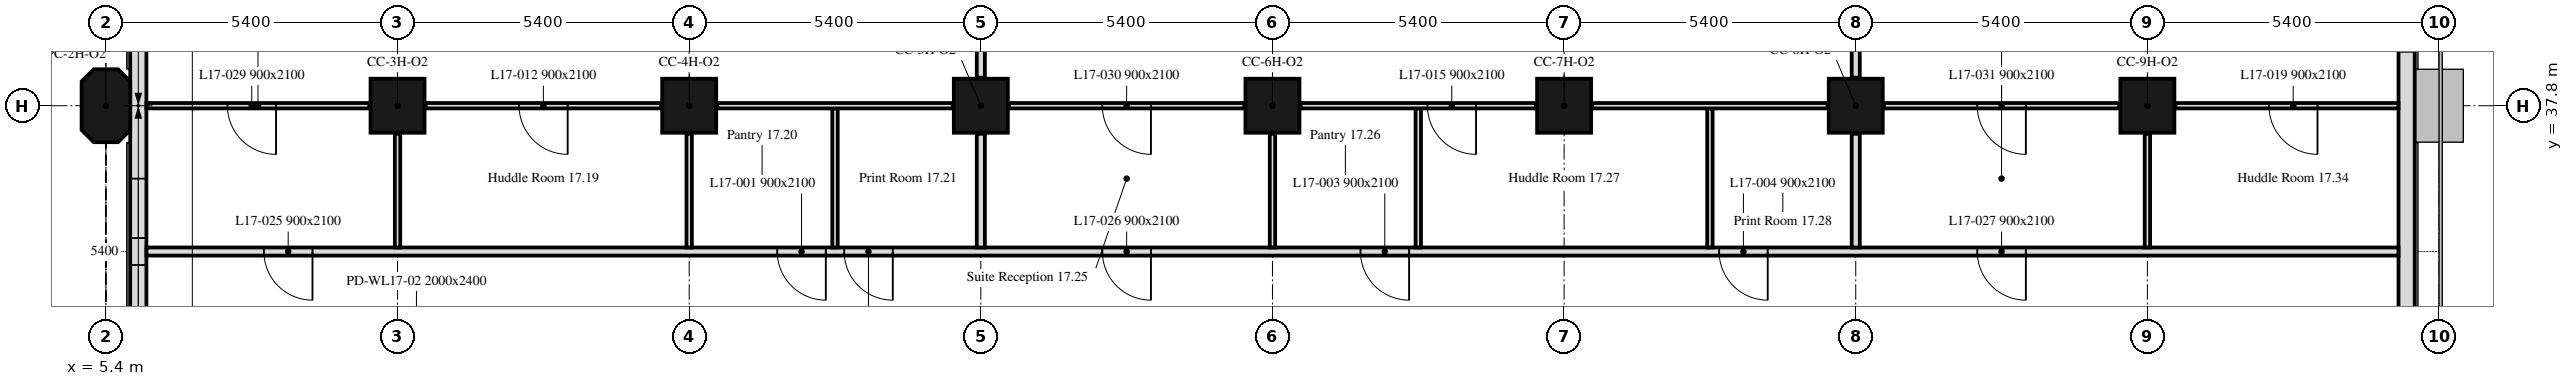
"""IFC4 building model, lengths in metres.
Left out: names, types, materials, properties, quantities, classifications, styles, units other than length and angle.
Written with IfcOpenShell. Run it as: python <this file> out.ifc"""

import sys

from ifc_helpers import new_model, si_unit, direction, frame, frame_2d, origin, origin_2d, place, context, subcontext, project, spatial, polyline, rectangle, outline, extrude, element, fill, save


model = new_model("IFC4")
c1 = context("Model", 3, precision=1e-05, world=origin(), true_north=direction((0.0, 1.0)))
c2 = subcontext(c1, "Body", "Model", "MODEL_VIEW")
j1 = project(units=[si_unit("LENGTHUNIT", "METRE"), si_unit("PLANEANGLEUNIT", "RADIAN")], contexts=[c1])
p1 = place(None, origin())
s1 = spatial("IfcSite", under=j1, at=p1, CompositionType="ELEMENT")
p2 = place(p1, origin())
s2 = spatial("IfcBuilding", under=s1, at=p2, CompositionType="ELEMENT")
p3 = place(p2, frame((0.0, 0.0, 76.4)))
s3 = spatial("IfcBuildingStorey", under=s2, at=p3, CompositionType="ELEMENT", Elevation=76.4)
p4 = place(p3, frame((5.4, 37.8, 0.0), z_axis=(0.0, 0.0, 1.0), x_axis=(0.0, 1.0, 0.0)))
e1 = element("IfcColumn", 1, at=p4, inside=s3, PredefinedType="COLUMN", context=c2, shape_type="SweptSolid", body=[
    extrude(outline(polyline([(-0.45, -0.45), (0.45, -0.45), (0.675, -0.225), (0.675, 0.225), (0.45, 0.45), (-0.45, 0.45), (-0.675, 0.225), (-0.675, -0.225), (-0.45, -0.45)])), origin(), (0.0, 0.0, 1.0), 3.5),
])
for number, where, z_axis, x_axis in (
    (2, (10.8, 37.8, 0.0), (0.0, 0.0, 1.0), (1.0, 0.0, 0.0)),
    (3, (16.2, 37.8, 0.0), (0.0, 0.0, 1.0), (1.0, 0.0, 0.0)),
    (4, (21.6, 37.8, 0.0), (0.0, 0.0, 1.0), (1.0, 0.0, 0.0)),
    (5, (27.0, 37.8, 0.0), (0.0, 0.0, 1.0), (1.0, 0.0, 0.0)),
    (6, (32.4, 37.8, 0.0), (0.0, 0.0, 1.0), (1.0, 0.0, 0.0)),
    (7, (37.8, 37.8, 0.0), (0.0, 0.0, 1.0), (1.0, 0.0, 0.0)),
    (8, (43.2, 37.8, 0.0), (0.0, 0.0, 1.0), (1.0, 0.0, 0.0)),
):
    element("IfcColumn", number, at=place(p3, frame(where, z_axis=z_axis, x_axis=x_axis)), inside=s3, PredefinedType="COLUMN", context=c2, shape_type="SweptSolid", body=[
        extrude(rectangle(XDim=1.0, YDim=1.0, at=origin_2d()), origin(), (0.0, 0.0, 1.0), 3.5),
    ])
p5 = place(p3, frame((48.0, 10.986, 0.0), z_axis=(0.0, 0.0, 1.0), x_axis=(0.0, 1.0, 0.0)))
e9 = element("IfcWall", 9, at=p5, inside=s3, PredefinedType="SOLIDWALL", context=c2, shape_type="SweptSolid", body=[
    extrude(rectangle(XDim=32.027, YDim=0.3, at=frame_2d((16.014, 0.0))), origin(), (0.0, 0.0, 1.0), 3.5),
])
p6 = place(p5, frame((6.214, 0.0, 0.9)))
e10 = element("IfcOpeningElement", 10, at=p6, cuts=e9, PredefinedType="OPENING", context=c2, shape_type="SweptSolid", body=[
    extrude(rectangle(XDim=3.4, YDim=1.7, at=frame_2d((1.7, 0.85))), frame((0.0, 0.16, 0.0), z_axis=(0.0, -1.0, 0.0), x_axis=(1.0, 0.0, 0.0)), (0.0, 0.0, 1.0), 0.32),
])
p7 = place(p5, frame((17.014, 0.0, 0.9)))
e11 = element("IfcOpeningElement", 11, at=p7, cuts=e9, PredefinedType="OPENING", context=c2, shape_type="SweptSolid", body=[
    extrude(rectangle(XDim=3.4, YDim=1.7, at=frame_2d((1.7, 0.85))), frame((0.0, 0.16, 0.0), z_axis=(0.0, -1.0, 0.0), x_axis=(1.0, 0.0, 0.0)), (0.0, 0.0, 1.0), 0.32),
])
p8 = place(p5, frame((27.814, 0.0, 0.9)))
e12 = element("IfcOpeningElement", 12, at=p8, cuts=e9, PredefinedType="OPENING", context=c2, shape_type="SweptSolid", body=[
    extrude(rectangle(XDim=3.4, YDim=1.7, at=frame_2d((1.7, 0.85))), frame((0.0, 0.16, 0.0), z_axis=(0.0, -1.0, 0.0), x_axis=(1.0, 0.0, 0.0)), (0.0, 0.0, 1.0), 0.32),
])
p9 = place(p3, frame((6.0, 43.014, 0.0), z_axis=(0.0, 0.0, 1.0), x_axis=(0.0, -1.0, 0.0)))
e13 = element("IfcWall", 13, at=p9, inside=s3, PredefinedType="SOLIDWALL", context=c2, shape_type="SweptSolid", body=[
    extrude(rectangle(XDim=10.614, YDim=0.3, at=frame_2d((5.307, 0.0))), origin(), (0.0, 0.0, 1.0), 3.5),
])
p10 = place(p9, frame((6.564, 0.0, 0.9)))
e14 = element("IfcOpeningElement", 14, at=p10, cuts=e13, PredefinedType="OPENING", context=c2, shape_type="SweptSolid", body=[
    extrude(rectangle(XDim=1.1, YDim=1.7, at=frame_2d((0.55, 0.85))), frame((0.0, 0.16, 0.0), z_axis=(0.0, -1.0, 0.0), x_axis=(1.0, 0.0, 0.0)), (0.0, 0.0, 1.0), 0.32),
])
p11 = place(p9, frame((8.164, 0.0, 0.9)))
e15 = element("IfcOpeningElement", 15, at=p11, cuts=e13, PredefinedType="OPENING", context=c2, shape_type="SweptSolid", body=[
    extrude(rectangle(XDim=1.1, YDim=1.7, at=frame_2d((0.55, 0.85))), frame((0.0, 0.16, 0.0), z_axis=(0.0, -1.0, 0.0), x_axis=(1.0, 0.0, 0.0)), (0.0, 0.0, 1.0), 0.32),
])
p12 = place(p3, frame((47.849, 35.1, 0.0), z_axis=(0.0, 0.0, 1.0), x_axis=(-1.0, 0.0, 0.0)))
e16 = element("IfcWall", 16, at=p12, inside=s3, PredefinedType="PARTITIONING", context=c2, shape_type="SweptSolid", body=[
    extrude(rectangle(XDim=41.698, YDim=0.15, at=frame_2d((20.849, 0.0))), origin(), (0.0, 0.0, 1.0), 2.75),
])
p13 = place(p12, frame((29.119, 0.0, 0.0)))
e17 = element("IfcOpeningElement", 17, at=p13, cuts=e16, PredefinedType="OPENING", context=c2, shape_type="SweptSolid", body=[
    extrude(rectangle(XDim=0.9, YDim=2.1, at=frame_2d((0.45, 1.05))), frame((0.0, 0.075, 0.0), z_axis=(0.0, -1.0, 0.0), x_axis=(1.0, 0.0, 0.0)), (0.0, 0.0, 1.0), 0.15),
])
p14 = place(p12, frame((27.879, 0.0, 0.0)))
e18 = element("IfcOpeningElement", 18, at=p14, cuts=e16, PredefinedType="OPENING", context=c2, shape_type="SweptSolid", body=[
    extrude(rectangle(XDim=0.9, YDim=2.1, at=frame_2d((0.45, 1.05))), frame((0.0, 0.075, 0.0), z_axis=(0.0, -1.0, 0.0), x_axis=(1.0, 0.0, 0.0)), (0.0, 0.0, 1.0), 0.15),
])
p15 = place(p12, frame((18.319, 0.0, 0.0)))
e19 = element("IfcOpeningElement", 19, at=p15, cuts=e16, PredefinedType="OPENING", context=c2, shape_type="SweptSolid", body=[
    extrude(rectangle(XDim=0.9, YDim=2.1, at=frame_2d((0.45, 1.05))), frame((0.0, 0.075, 0.0), z_axis=(0.0, -1.0, 0.0), x_axis=(1.0, 0.0, 0.0)), (0.0, 0.0, 1.0), 0.15),
])
p16 = place(p12, frame((11.679, 0.0, 0.0)))
e20 = element("IfcOpeningElement", 20, at=p16, cuts=e16, PredefinedType="OPENING", context=c2, shape_type="SweptSolid", body=[
    extrude(rectangle(XDim=0.9, YDim=2.1, at=frame_2d((0.45, 1.05))), frame((0.0, 0.075, 0.0), z_axis=(0.0, -1.0, 0.0), x_axis=(1.0, 0.0, 0.0)), (0.0, 0.0, 1.0), 0.15),
])
p17 = place(p12, frame((38.624, 0.0, 0.0)))
e21 = element("IfcOpeningElement", 21, at=p17, cuts=e16, PredefinedType="OPENING", context=c2, shape_type="SweptSolid", body=[
    extrude(rectangle(XDim=0.9, YDim=2.1, at=frame_2d((0.45, 1.05))), frame((0.0, 0.075, 0.0), z_axis=(0.0, -1.0, 0.0), x_axis=(1.0, 0.0, 0.0)), (0.0, 0.0, 1.0), 0.15),
])
p18 = place(p12, frame((23.099, 0.0, 0.0)))
e22 = element("IfcOpeningElement", 22, at=p18, cuts=e16, PredefinedType="OPENING", context=c2, shape_type="SweptSolid", body=[
    extrude(rectangle(XDim=0.9, YDim=2.1, at=frame_2d((0.45, 1.05))), frame((0.0, 0.075, 0.0), z_axis=(0.0, -1.0, 0.0), x_axis=(1.0, 0.0, 0.0)), (0.0, 0.0, 1.0), 0.15),
])
p19 = place(p12, frame((6.899, 0.0, 0.0)))
e23 = element("IfcOpeningElement", 23, at=p19, cuts=e16, PredefinedType="OPENING", context=c2, shape_type="SweptSolid", body=[
    extrude(rectangle(XDim=0.9, YDim=2.1, at=frame_2d((0.45, 1.05))), frame((0.0, 0.075, 0.0), z_axis=(0.0, -1.0, 0.0), x_axis=(1.0, 0.0, 0.0)), (0.0, 0.0, 1.0), 0.15),
])
p20 = place(p3, frame((10.28, 37.8, 0.0), z_axis=(0.0, 0.0, 1.0), x_axis=(-1.0, 0.0, 0.0)))
e24 = element("IfcWall", 24, at=p20, inside=s3, PredefinedType="PARTITIONING", context=c2, shape_type="SweptSolid", body=[
    extrude(rectangle(XDim=4.129, YDim=0.1, at=frame_2d((2.064, 0.0))), origin(), (0.0, 0.0, 1.0), 3.5),
])
p21 = place(p20, frame((1.73, 0.0, 0.0)))
e25 = element("IfcOpeningElement", 25, at=p21, cuts=e24, PredefinedType="OPENING", context=c2, shape_type="SweptSolid", body=[
    extrude(rectangle(XDim=0.9, YDim=2.1, at=frame_2d((0.45, 1.05))), frame((0.0, 0.05, 0.0), z_axis=(0.0, -1.0, 0.0), x_axis=(1.0, 0.0, 0.0)), (0.0, 0.0, 1.0), 0.1),
])
p22 = place(p3, frame((10.8, 35.175, 0.0), z_axis=(0.0, 0.0, 1.0), x_axis=(0.0, 1.0, 0.0)))
e26 = element("IfcWall", 26, at=p22, inside=s3, PredefinedType="PARTITIONING", context=c2, shape_type="SweptSolid", body=[
    extrude(rectangle(XDim=2.105, YDim=0.1, at=frame_2d((1.052, 0.0))), origin(), (0.0, 0.0, 1.0), 3.5),
])
p23 = place(p3, frame((16.2, 35.175, 0.0), z_axis=(0.0, 0.0, 1.0), x_axis=(0.0, 1.0, 0.0)))
e27 = element("IfcWall", 27, at=p23, inside=s3, PredefinedType="PARTITIONING", context=c2, shape_type="SweptSolid", body=[
    extrude(rectangle(XDim=2.105, YDim=0.1, at=frame_2d((1.052, 0.0))), origin(), (0.0, 0.0, 1.0), 2.75),
])
p24 = place(p3, frame((15.68, 37.8, 0.0), z_axis=(0.0, 0.0, 1.0), x_axis=(-1.0, 0.0, 0.0)))
e28 = element("IfcWall", 28, at=p24, inside=s3, PredefinedType="PARTITIONING", context=c2, shape_type="SweptSolid", body=[
    extrude(rectangle(XDim=4.36, YDim=0.1, at=frame_2d((2.18, 0.0))), origin(), (0.0, 0.0, 1.0), 3.5),
])
p25 = place(p24, frame((1.73, 0.0, 0.0)))
e29 = element("IfcOpeningElement", 29, at=p25, cuts=e28, PredefinedType="OPENING", context=c2, shape_type="SweptSolid", body=[
    extrude(rectangle(XDim=0.9, YDim=2.1, at=frame_2d((0.45, 1.05))), frame((0.0, 0.05, 0.0), z_axis=(0.0, -1.0, 0.0), x_axis=(1.0, 0.0, 0.0)), (0.0, 0.0, 1.0), 0.1),
])
p26 = place(p3, frame((18.9, 35.175, 0.0), z_axis=(0.0, 0.0, 1.0), x_axis=(0.0, 1.0, 0.0)))
e30 = element("IfcWall", 30, at=p26, inside=s3, PredefinedType="PARTITIONING", context=c2, shape_type="SweptSolid", body=[
    extrude(rectangle(XDim=2.575, YDim=0.1, at=frame_2d((1.288, 0.0))), origin(), (0.0, 0.0, 1.0), 3.5),
])
p27 = place(p3, frame((21.6, 35.175, 0.0), z_axis=(0.0, 0.0, 1.0), x_axis=(0.0, 1.0, 0.0)))
e31 = element("IfcWall", 31, at=p27, inside=s3, PredefinedType="PARTITIONING", context=c2, shape_type="SweptSolid", body=[
    extrude(rectangle(XDim=2.105, YDim=0.15, at=frame_2d((1.052, 0.0))), origin(), (0.0, 0.0, 1.0), 2.75),
])
p28 = place(p3, frame((21.08, 37.8, 0.0), z_axis=(0.0, 0.0, 1.0), x_axis=(-1.0, 0.0, 0.0)))
e32 = element("IfcWall", 32, at=p28, inside=s3, PredefinedType="PARTITIONING", context=c2, shape_type="SweptSolid", body=[
    extrude(rectangle(XDim=4.36, YDim=0.1, at=frame_2d((2.18, 0.0))), origin(), (0.0, 0.0, 1.0), 3.5),
])
p29 = place(p3, frame((21.6, 38.32, 0.0), z_axis=(0.0, 0.0, 1.0), x_axis=(0.0, 1.0, 0.0)))
e33 = element("IfcWall", 33, at=p29, inside=s3, PredefinedType="PARTITIONING", context=c2, shape_type="SweptSolid", body=[
    extrude(rectangle(XDim=4.36, YDim=0.15, at=frame_2d((2.18, 0.0))), origin(), (0.0, 0.0, 1.0), 2.75),
])
p30 = place(p3, frame((27.0, 35.175, 0.0), z_axis=(0.0, 0.0, 1.0), x_axis=(0.0, 1.0, 0.0)))
e34 = element("IfcWall", 34, at=p30, inside=s3, PredefinedType="PARTITIONING", context=c2, shape_type="SweptSolid", body=[
    extrude(rectangle(XDim=2.105, YDim=0.1, at=frame_2d((1.052, 0.0))), origin(), (0.0, 0.0, 1.0), 2.75),
])
p31 = place(p3, frame((26.48, 37.8, 0.0), z_axis=(0.0, 0.0, 1.0), x_axis=(-1.0, 0.0, 0.0)))
e35 = element("IfcWall", 35, at=p31, inside=s3, PredefinedType="PARTITIONING", context=c2, shape_type="SweptSolid", body=[
    extrude(rectangle(XDim=4.36, YDim=0.1, at=frame_2d((2.18, 0.0))), origin(), (0.0, 0.0, 1.0), 3.5),
])
p32 = place(p31, frame((1.73, 0.0, 0.0)))
e36 = element("IfcOpeningElement", 36, at=p32, cuts=e35, PredefinedType="OPENING", context=c2, shape_type="SweptSolid", body=[
    extrude(rectangle(XDim=0.9, YDim=2.1, at=frame_2d((0.45, 1.05))), frame((0.0, 0.05, 0.0), z_axis=(0.0, -1.0, 0.0), x_axis=(1.0, 0.0, 0.0)), (0.0, 0.0, 1.0), 0.1),
])
for number, where, z_axis, x_axis in (
    (37, (29.7, 35.175, 0.0), (0.0, 0.0, 1.0), (0.0, 1.0, 0.0)),
    (38, (35.1, 35.175, 0.0), (0.0, 0.0, 1.0), (0.0, 1.0, 0.0)),
):
    element("IfcWall", number, at=place(p3, frame(where, z_axis=z_axis, x_axis=x_axis)), inside=s3, PredefinedType="PARTITIONING", context=c2, shape_type="SweptSolid", body=[
        extrude(rectangle(XDim=2.575, YDim=0.1, at=frame_2d((1.288, 0.0))), origin(), (0.0, 0.0, 1.0), 3.5),
    ])
p33 = place(p3, frame((31.88, 37.8, 0.0), z_axis=(0.0, 0.0, 1.0), x_axis=(-1.0, 0.0, 0.0)))
e39 = element("IfcWall", 39, at=p33, inside=s3, PredefinedType="PARTITIONING", context=c2, shape_type="SweptSolid", body=[
    extrude(rectangle(XDim=4.36, YDim=0.1, at=frame_2d((2.18, 0.0))), origin(), (0.0, 0.0, 1.0), 3.5),
])
p34 = place(p33, frame((1.11, 0.0, 0.0)))
e40 = element("IfcOpeningElement", 40, at=p34, cuts=e39, PredefinedType="OPENING", context=c2, shape_type="SweptSolid", body=[
    extrude(rectangle(XDim=0.9, YDim=2.1, at=frame_2d((0.45, 1.05))), frame((0.0, 0.05, 0.0), z_axis=(0.0, -1.0, 0.0), x_axis=(1.0, 0.0, 0.0)), (0.0, 0.0, 1.0), 0.1),
])
p35 = place(p3, frame((37.8, 35.175, 0.0), z_axis=(0.0, 0.0, 1.0), x_axis=(0.0, 1.0, 0.0)))
e41 = element("IfcWall", 41, at=p35, inside=s3, PredefinedType="PARTITIONING", context=c2, shape_type="SweptSolid", body=[
    extrude(rectangle(XDim=2.105, YDim=0.15, at=frame_2d((1.052, 0.0))), origin(), (0.0, 0.0, 1.0), 2.75),
])
p36 = place(p3, frame((37.28, 37.8, 0.0), z_axis=(0.0, 0.0, 1.0), x_axis=(-1.0, 0.0, 0.0)))
e42 = element("IfcWall", 42, at=p36, inside=s3, PredefinedType="PARTITIONING", context=c2, shape_type="SweptSolid", body=[
    extrude(rectangle(XDim=4.36, YDim=0.1, at=frame_2d((2.18, 0.0))), origin(), (0.0, 0.0, 1.0), 2.75),
])
p37 = place(p3, frame((37.8, 38.32, 0.0), z_axis=(0.0, 0.0, 1.0), x_axis=(0.0, 1.0, 0.0)))
e43 = element("IfcWall", 43, at=p37, inside=s3, PredefinedType="PARTITIONING", context=c2, shape_type="SweptSolid", body=[
    extrude(rectangle(XDim=4.36, YDim=0.15, at=frame_2d((2.18, 0.0))), origin(), (0.0, 0.0, 1.0), 2.75),
])
p38 = place(p3, frame((43.2, 35.175, 0.0), z_axis=(0.0, 0.0, 1.0), x_axis=(0.0, 1.0, 0.0)))
e44 = element("IfcWall", 44, at=p38, inside=s3, PredefinedType="PARTITIONING", context=c2, shape_type="SweptSolid", body=[
    extrude(rectangle(XDim=2.105, YDim=0.1, at=frame_2d((1.052, 0.0))), origin(), (0.0, 0.0, 1.0), 3.5),
])
p39 = place(p3, frame((42.68, 37.8, 0.0), z_axis=(0.0, 0.0, 1.0), x_axis=(-1.0, 0.0, 0.0)))
e45 = element("IfcWall", 45, at=p39, inside=s3, PredefinedType="PARTITIONING", context=c2, shape_type="SweptSolid", body=[
    extrude(rectangle(XDim=4.36, YDim=0.1, at=frame_2d((2.18, 0.0))), origin(), (0.0, 0.0, 1.0), 2.75),
])
p40 = place(p39, frame((1.73, 0.0, 0.0)))
e46 = element("IfcOpeningElement", 46, at=p40, cuts=e45, PredefinedType="OPENING", context=c2, shape_type="SweptSolid", body=[
    extrude(rectangle(XDim=0.9, YDim=2.1, at=frame_2d((0.45, 1.05))), frame((0.0, 0.05, 0.0), z_axis=(0.0, -1.0, 0.0), x_axis=(1.0, 0.0, 0.0)), (0.0, 0.0, 1.0), 0.1),
])
p41 = place(p3, frame((47.849, 37.8, 0.0), z_axis=(0.0, 0.0, 1.0), x_axis=(-1.0, 0.0, 0.0)))
e47 = element("IfcWall", 47, at=p41, inside=s3, PredefinedType="PARTITIONING", context=c2, shape_type="SweptSolid", body=[
    extrude(rectangle(XDim=4.129, YDim=0.1, at=frame_2d((2.064, 0.0))), origin(), (0.0, 0.0, 1.0), 2.75),
])
p42 = place(p41, frame((1.499, 0.0, 0.0)))
e48 = element("IfcOpeningElement", 48, at=p42, cuts=e47, PredefinedType="OPENING", context=c2, shape_type="SweptSolid", body=[
    extrude(rectangle(XDim=0.9, YDim=2.1, at=frame_2d((0.45, 1.05))), frame((0.0, 0.05, 0.0), z_axis=(0.0, -1.0, 0.0), x_axis=(1.0, 0.0, 0.0)), (0.0, 0.0, 1.0), 0.1),
])
p43 = place(p10, origin())
e49 = element("IfcWindow", 49, at=p43, inside=s3, PartitioningType="SINGLE_PANEL", PredefinedType="WINDOW", context=c2, shape_type="SweptSolid", body=[
    extrude(rectangle(XDim=1.1, YDim=1.7, at=frame_2d((0.55, 0.85))), frame((0.0, 0.03, 0.0), z_axis=(0.0, -1.0, 0.0), x_axis=(1.0, 0.0, 0.0)), (0.0, 0.0, 1.0), 0.06),
])
fill(e14, e49)
p44 = place(p11, origin())
e50 = element("IfcWindow", 50, at=p44, inside=s3, PartitioningType="SINGLE_PANEL", PredefinedType="WINDOW", context=c2, shape_type="SweptSolid", body=[
    extrude(rectangle(XDim=1.1, YDim=1.7, at=frame_2d((0.55, 0.85))), frame((0.0, 0.03, 0.0), z_axis=(0.0, -1.0, 0.0), x_axis=(1.0, 0.0, 0.0)), (0.0, 0.0, 1.0), 0.06),
])
fill(e15, e50)
p45 = place(p13, origin())
e51 = element("IfcDoor", 51, at=p45, inside=s3, OperationType="SINGLE_SWING_LEFT", PredefinedType="DOOR", context=c2, shape_type="SweptSolid", body=[
    extrude(rectangle(XDim=0.9, YDim=2.1, at=frame_2d((0.45, 1.05))), frame((0.0, 0.025, 0.0), z_axis=(0.0, -1.0, 0.0), x_axis=(1.0, 0.0, 0.0)), (0.0, 0.0, 1.0), 0.05),
])
fill(e17, e51)
p46 = place(p14, origin())
e52 = element("IfcDoor", 52, at=p46, inside=s3, OperationType="SINGLE_SWING_LEFT", PredefinedType="DOOR", context=c2, shape_type="SweptSolid", body=[
    extrude(rectangle(XDim=0.9, YDim=2.1, at=frame_2d((0.45, 1.05))), frame((0.0, 0.025, 0.0), z_axis=(0.0, -1.0, 0.0), x_axis=(1.0, 0.0, 0.0)), (0.0, 0.0, 1.0), 0.05),
])
fill(e18, e52)
p47 = place(p15, origin())
e53 = element("IfcDoor", 53, at=p47, inside=s3, OperationType="SINGLE_SWING_LEFT", PredefinedType="DOOR", context=c2, shape_type="SweptSolid", body=[
    extrude(rectangle(XDim=0.9, YDim=2.1, at=frame_2d((0.45, 1.05))), frame((0.0, 0.025, 0.0), z_axis=(0.0, -1.0, 0.0), x_axis=(1.0, 0.0, 0.0)), (0.0, 0.0, 1.0), 0.05),
])
fill(e19, e53)
p48 = place(p16, origin())
e54 = element("IfcDoor", 54, at=p48, inside=s3, OperationType="SINGLE_SWING_LEFT", PredefinedType="DOOR", context=c2, shape_type="SweptSolid", body=[
    extrude(rectangle(XDim=0.9, YDim=2.1, at=frame_2d((0.45, 1.05))), frame((0.0, 0.025, 0.0), z_axis=(0.0, -1.0, 0.0), x_axis=(1.0, 0.0, 0.0)), (0.0, 0.0, 1.0), 0.05),
])
fill(e20, e54)
p49 = place(p25, origin())
e55 = element("IfcDoor", 55, at=p49, inside=s3, OperationType="SINGLE_SWING_LEFT", PredefinedType="DOOR", context=c2, shape_type="SweptSolid", body=[
    extrude(rectangle(XDim=0.9, YDim=2.1, at=frame_2d((0.45, 1.05))), frame((0.0, 0.025, 0.0), z_axis=(0.0, -1.0, 0.0), x_axis=(1.0, 0.0, 0.0)), (0.0, 0.0, 1.0), 0.05),
])
fill(e29, e55)
p50 = place(p34, origin())
e56 = element("IfcDoor", 56, at=p50, inside=s3, OperationType="SINGLE_SWING_RIGHT", PredefinedType="DOOR", context=c2, shape_type="SweptSolid", body=[
    extrude(rectangle(XDim=0.9, YDim=2.1, at=frame_2d((0.45, 1.05))), frame((0.0, 0.025, 0.0), z_axis=(0.0, -1.0, 0.0), x_axis=(1.0, 0.0, 0.0)), (0.0, 0.0, 1.0), 0.05),
])
fill(e40, e56)
p51 = place(p42, origin())
e57 = element("IfcDoor", 57, at=p51, inside=s3, OperationType="SINGLE_SWING_LEFT", PredefinedType="DOOR", context=c2, shape_type="SweptSolid", body=[
    extrude(rectangle(XDim=0.9, YDim=2.1, at=frame_2d((0.45, 1.05))), frame((0.0, 0.025, 0.0), z_axis=(0.0, -1.0, 0.0), x_axis=(1.0, 0.0, 0.0)), (0.0, 0.0, 1.0), 0.05),
])
fill(e48, e57)
p52 = place(p17, origin())
e58 = element("IfcDoor", 58, at=p52, inside=s3, OperationType="SINGLE_SWING_LEFT", PredefinedType="DOOR", context=c2, shape_type="SweptSolid", body=[
    extrude(rectangle(XDim=0.9, YDim=2.1, at=frame_2d((0.45, 1.05))), frame((0.0, 0.025, 0.0), z_axis=(0.0, -1.0, 0.0), x_axis=(1.0, 0.0, 0.0)), (0.0, 0.0, 1.0), 0.05),
])
fill(e21, e58)
p53 = place(p18, origin())
e59 = element("IfcDoor", 59, at=p53, inside=s3, OperationType="SINGLE_SWING_LEFT", PredefinedType="DOOR", context=c2, shape_type="SweptSolid", body=[
    extrude(rectangle(XDim=0.9, YDim=2.1, at=frame_2d((0.45, 1.05))), frame((0.0, 0.025, 0.0), z_axis=(0.0, -1.0, 0.0), x_axis=(1.0, 0.0, 0.0)), (0.0, 0.0, 1.0), 0.05),
])
fill(e22, e59)
p54 = place(p19, origin())
e60 = element("IfcDoor", 60, at=p54, inside=s3, OperationType="SINGLE_SWING_LEFT", PredefinedType="DOOR", context=c2, shape_type="SweptSolid", body=[
    extrude(rectangle(XDim=0.9, YDim=2.1, at=frame_2d((0.45, 1.05))), frame((0.0, 0.025, 0.0), z_axis=(0.0, -1.0, 0.0), x_axis=(1.0, 0.0, 0.0)), (0.0, 0.0, 1.0), 0.05),
])
fill(e23, e60)
p55 = place(p21, origin())
e61 = element("IfcDoor", 61, at=p55, inside=s3, OperationType="SINGLE_SWING_RIGHT", PredefinedType="DOOR", context=c2, shape_type="SweptSolid", body=[
    extrude(rectangle(XDim=0.9, YDim=2.1, at=frame_2d((0.45, 1.05))), frame((0.0, 0.025, 0.0), z_axis=(0.0, -1.0, 0.0), x_axis=(1.0, 0.0, 0.0)), (0.0, 0.0, 1.0), 0.05),
])
fill(e25, e61)
p56 = place(p32, origin())
e62 = element("IfcDoor", 62, at=p56, inside=s3, OperationType="SINGLE_SWING_LEFT", PredefinedType="DOOR", context=c2, shape_type="SweptSolid", body=[
    extrude(rectangle(XDim=0.9, YDim=2.1, at=frame_2d((0.45, 1.05))), frame((0.0, 0.025, 0.0), z_axis=(0.0, -1.0, 0.0), x_axis=(1.0, 0.0, 0.0)), (0.0, 0.0, 1.0), 0.05),
])
fill(e36, e62)
p57 = place(p40, origin())
e63 = element("IfcDoor", 63, at=p57, inside=s3, OperationType="SINGLE_SWING_RIGHT", PredefinedType="DOOR", context=c2, shape_type="SweptSolid", body=[
    extrude(rectangle(XDim=0.9, YDim=2.1, at=frame_2d((0.45, 1.05))), frame((0.0, 0.025, 0.0), z_axis=(0.0, -1.0, 0.0), x_axis=(1.0, 0.0, 0.0)), (0.0, 0.0, 1.0), 0.05),
])
fill(e46, e63)
save(model, sys.argv[1])
